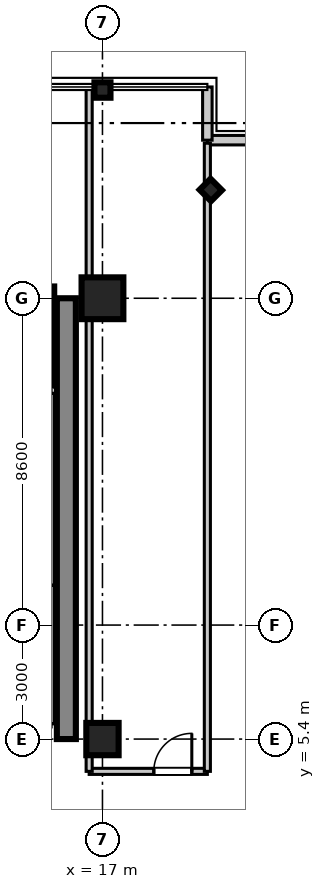
"""IFC4 building model, lengths in metres.
Left out: names, types, materials, properties, quantities, classifications, styles, units other than length and angle.
Written with IfcOpenShell. Run it as: python <this file> out.ifc"""

import sys

from ifc_helpers import new_model, si_unit, direction, frame, frame_2d, origin, origin_2d, place, context, subcontext, project, spatial, rectangle, i_section, extrude, source, transform, mapped, element, fill, save


model = new_model("IFC4")
c1 = context("Model", 3, precision=1e-05, world=origin(), true_north=direction((0.0, 1.0)))
c2 = subcontext(c1, "Body", "Model", "MODEL_VIEW")
j1 = project(units=[si_unit("LENGTHUNIT", "METRE"), si_unit("PLANEANGLEUNIT", "RADIAN")], contexts=[c1])
p1 = place(None, origin())
s1 = spatial("IfcSite", under=j1, at=p1, CompositionType="ELEMENT")
p2 = place(p1, origin())
s2 = spatial("IfcBuilding", under=s1, at=p2, CompositionType="ELEMENT")
p3 = place(p2, frame((0.0, 0.0, 178.2)))
s3 = spatial("IfcBuildingStorey", under=s2, at=p3, CompositionType="ELEMENT", Elevation=178.2)
m1 = source(origin(), c2, "Body", "SweptSolid", [
    extrude(rectangle(XDim=0.85, YDim=0.85, at=origin_2d()), origin(), (0.0, 0.0, 1.0), 3.605),
])
p4 = place(p3, frame((17.0, 5.4, 0.0), z_axis=(0.0, 0.0, 1.0), x_axis=(1.0, 0.0, 0.0)))
e1 = element("IfcColumn", 1, at=p4, inside=s3, PredefinedType="PILASTER", context=c2, shape_type="MappedRepresentation", body=[
    mapped(m1, transform((0.0, 0.0, 0.0), scale=1.0)),
])
m2 = source(origin(), c2, "Body", "SweptSolid", [
    extrude(rectangle(XDim=1.1, YDim=1.1, at=origin_2d()), origin(), (0.0, 0.0, 1.0), 3.605),
])
p5 = place(p3, frame((17.0, 17.0, 0.0), z_axis=(0.0, 0.0, 1.0), x_axis=(1.0, 0.0, 0.0)))
e2 = element("IfcColumn", 2, at=p5, inside=s3, PredefinedType="COLUMN", context=c2, shape_type="MappedRepresentation", body=[
    mapped(m2, transform((0.0, 0.0, 0.0), scale=1.0)),
])
m3 = source(origin(), c2, "Body", "SweptSolid", [
    extrude(i_section(OverallWidth=0.406, OverallDepth=0.422, WebThickness=0.019, FlangeThickness=0.03, at=origin_2d()), origin(), (0.0, 0.0, 1.0), 3.605),
])
for number, where, z_axis, x_axis in (
    (3, (17.0, 22.48, 0.0), (0.0, 0.0, 1.0), (0.0, 1.0, 0.0)),
    (4, (19.85, 19.85, 0.0), (0.0, 0.0, 1.0), (0.707, 0.707, 0.0)),
):
    element("IfcColumn", number, at=place(p3, frame(where, z_axis=z_axis, x_axis=x_axis)), inside=s3, PredefinedType="COLUMN", context=c2, shape_type="MappedRepresentation", body=[
        mapped(m3, transform((0.0, 0.0, 0.0), scale=1.0)),
    ])
m4 = source(origin(), c2, "Body", "SweptSolid", [
    extrude(rectangle(XDim=11.6, YDim=0.5, at=frame_2d((5.8, 0.0))), origin(), (0.0, 0.0, 1.0), 3.39),
])
p6 = place(p3, frame((16.05, 5.4, 0.0), z_axis=(0.0, 0.0, 1.0), x_axis=(0.0, 1.0, 0.0)))
e5 = element("IfcWall", 5, at=p6, inside=s3, PredefinedType="SHEAR", context=c2, shape_type="MappedRepresentation", body=[
    mapped(m4, transform((0.0, 0.0, 0.0), scale=1.0)),
])
m5 = source(origin(), c2, "Body", "SweptSolid", [
    extrude(rectangle(XDim=2.61, YDim=0.22, at=frame_2d((1.305, 0.0))), origin(), (0.0, 0.0, 1.0), 3.39),
])
p7 = place(p3, frame((15.62, 14.7, 0.0), z_axis=(0.0, 0.0, 1.0), x_axis=(0.0, 1.0, 0.0)))
e6 = element("IfcWall", 6, at=p7, inside=s3, PredefinedType="SHEAR", context=c2, shape_type="MappedRepresentation", body=[
    mapped(m5, transform((0.0, 0.0, 0.0), scale=1.0)),
])
m6 = source(origin(), c2, "Body", "SweptSolid", [
    extrude(rectangle(XDim=1.4, YDim=0.25, at=frame_2d((0.7, 0.0))), origin(), (0.0, 0.0, 1.0), 3.39),
])
p8 = place(p3, frame((19.76, 21.16, 0.0), z_axis=(0.0, 0.0, 1.0), x_axis=(1.0, 0.0, 0.0)))
e7 = element("IfcWall", 7, at=p8, inside=s3, PredefinedType="STANDARD", context=c2, shape_type="MappedRepresentation", body=[
    mapped(m6, transform((0.0, 0.0, 0.0), scale=1.0)),
])
m7 = source(origin(), c2, "Body", "SweptSolid", [
    extrude(rectangle(XDim=1.4, YDim=0.25, at=frame_2d((0.7, 0.0))), origin(), (0.0, 0.0, 1.0), 3.39),
])
p9 = place(p3, frame((19.76, 21.16, 0.0), z_axis=(0.0, 0.0, 1.0), x_axis=(0.0, 1.0, 0.0)))
e8 = element("IfcWall", 8, at=p9, inside=s3, PredefinedType="STANDARD", context=c2, shape_type="MappedRepresentation", body=[
    mapped(m7, transform((0.0, 0.0, 0.0), scale=1.0)),
])
m8 = source(origin(), c2, "Body", "SweptSolid", [
    extrude(rectangle(XDim=3.65, YDim=0.16, at=frame_2d((1.825, 0.0))), origin(), (0.0, 0.0, 1.0), 2.73),
])
p10 = place(p3, frame((15.65, 5.8, 0.0), z_axis=(0.0, 0.0, 1.0), x_axis=(0.0, 1.0, 0.0)))
e9 = element("IfcWall", 9, at=p10, inside=s3, PredefinedType="PARTITIONING", context=c2, shape_type="MappedRepresentation", body=[
    mapped(m8, transform((0.0, 0.0, 0.0), scale=1.0)),
])
m9 = source(origin(), c2, "Body", "SweptSolid", [
    extrude(rectangle(XDim=5.05, YDim=0.16, at=frame_2d((2.525, 0.0))), origin(), (0.0, 0.0, 1.0), 2.73),
])
p11 = place(p3, frame((15.65, 9.45, 0.0), z_axis=(0.0, 0.0, 1.0), x_axis=(0.0, 1.0, 0.0)))
e10 = element("IfcWall", 10, at=p11, inside=s3, PredefinedType="PARTITIONING", context=c2, shape_type="MappedRepresentation", body=[
    mapped(m9, transform((0.0, 0.0, 0.0), scale=1.0)),
])
m10 = source(origin(), c2, "Body", "SweptSolid", [
    extrude(rectangle(XDim=3.11, YDim=0.16, at=frame_2d((1.555, 0.0))), origin(), (0.0, 0.0, 1.0), 2.73),
])
p12 = place(p3, frame((16.65, 4.55, 0.0), z_axis=(0.0, 0.0, 1.0), x_axis=(1.0, 0.0, 0.0)))
e11 = element("IfcWall", 11, at=p12, inside=s3, PredefinedType="PARTITIONING", context=c2, shape_type="MappedRepresentation", body=[
    mapped(m10, transform((0.0, 0.0, 0.0), scale=1.0)),
])
p13 = place(p12, frame((1.701, 0.0, 0.0)))
e12 = element("IfcOpeningElement", 12, at=p13, cuts=e11, PredefinedType="OPENING", context=c2, shape_type="SweptSolid", body=[
    extrude(rectangle(XDim=1.0, YDim=2.1, at=frame_2d((0.5, 1.05))), frame((0.0, 0.09, 0.0), z_axis=(0.0, -1.0, 0.0), x_axis=(1.0, 0.0, 0.0)), (0.0, 0.0, 1.0), 0.18),
])
m11 = source(origin(), c2, "Body", "SweptSolid", [
    extrude(rectangle(XDim=17.95, YDim=0.16, at=frame_2d((8.975, 0.0))), origin(), (0.0, 0.0, 1.0), 2.73),
])
p14 = place(p3, frame((16.65, 4.55, 0.0), z_axis=(0.0, 0.0, 1.0), x_axis=(0.0, 1.0, 0.0)))
e13 = element("IfcWall", 13, at=p14, inside=s3, PredefinedType="PARTITIONING", context=c2, shape_type="MappedRepresentation", body=[
    mapped(m11, transform((0.0, 0.0, 0.0), scale=1.0)),
])
m12 = source(origin(), c2, "Body", "SweptSolid", [
    extrude(rectangle(XDim=16.53, YDim=0.16, at=frame_2d((8.265, 0.0))), origin(), (0.0, 0.0, 1.0), 2.73),
])
p15 = place(p3, frame((19.76, 4.55, 0.0), z_axis=(0.0, 0.0, 1.0), x_axis=(0.0, 1.0, 0.0)))
e14 = element("IfcWall", 14, at=p15, inside=s3, PredefinedType="PARTITIONING", context=c2, shape_type="MappedRepresentation", body=[
    mapped(m12, transform((0.0, 0.0, 0.0), scale=1.0)),
])
m13 = source(origin(), c2, "Body", "SweptSolid", [
    extrude(rectangle(XDim=1.0, YDim=2.1, at=frame_2d((0.5, 1.05))), frame((0.0, 0.025, 0.0), z_axis=(0.0, -1.0, 0.0), x_axis=(1.0, 0.0, 0.0)), (0.0, 0.0, 1.0), 0.05),
])
p16 = place(p13, origin())
e15 = element("IfcDoor", 15, at=p16, inside=s3, OperationType="SINGLE_SWING_RIGHT", PredefinedType="DOOR", context=c2, shape_type="MappedRepresentation", body=[
    mapped(m13, transform((0.0, 0.0, 0.0), scale=1.0)),
])
fill(e12, e15)
save(model, sys.argv[1])
